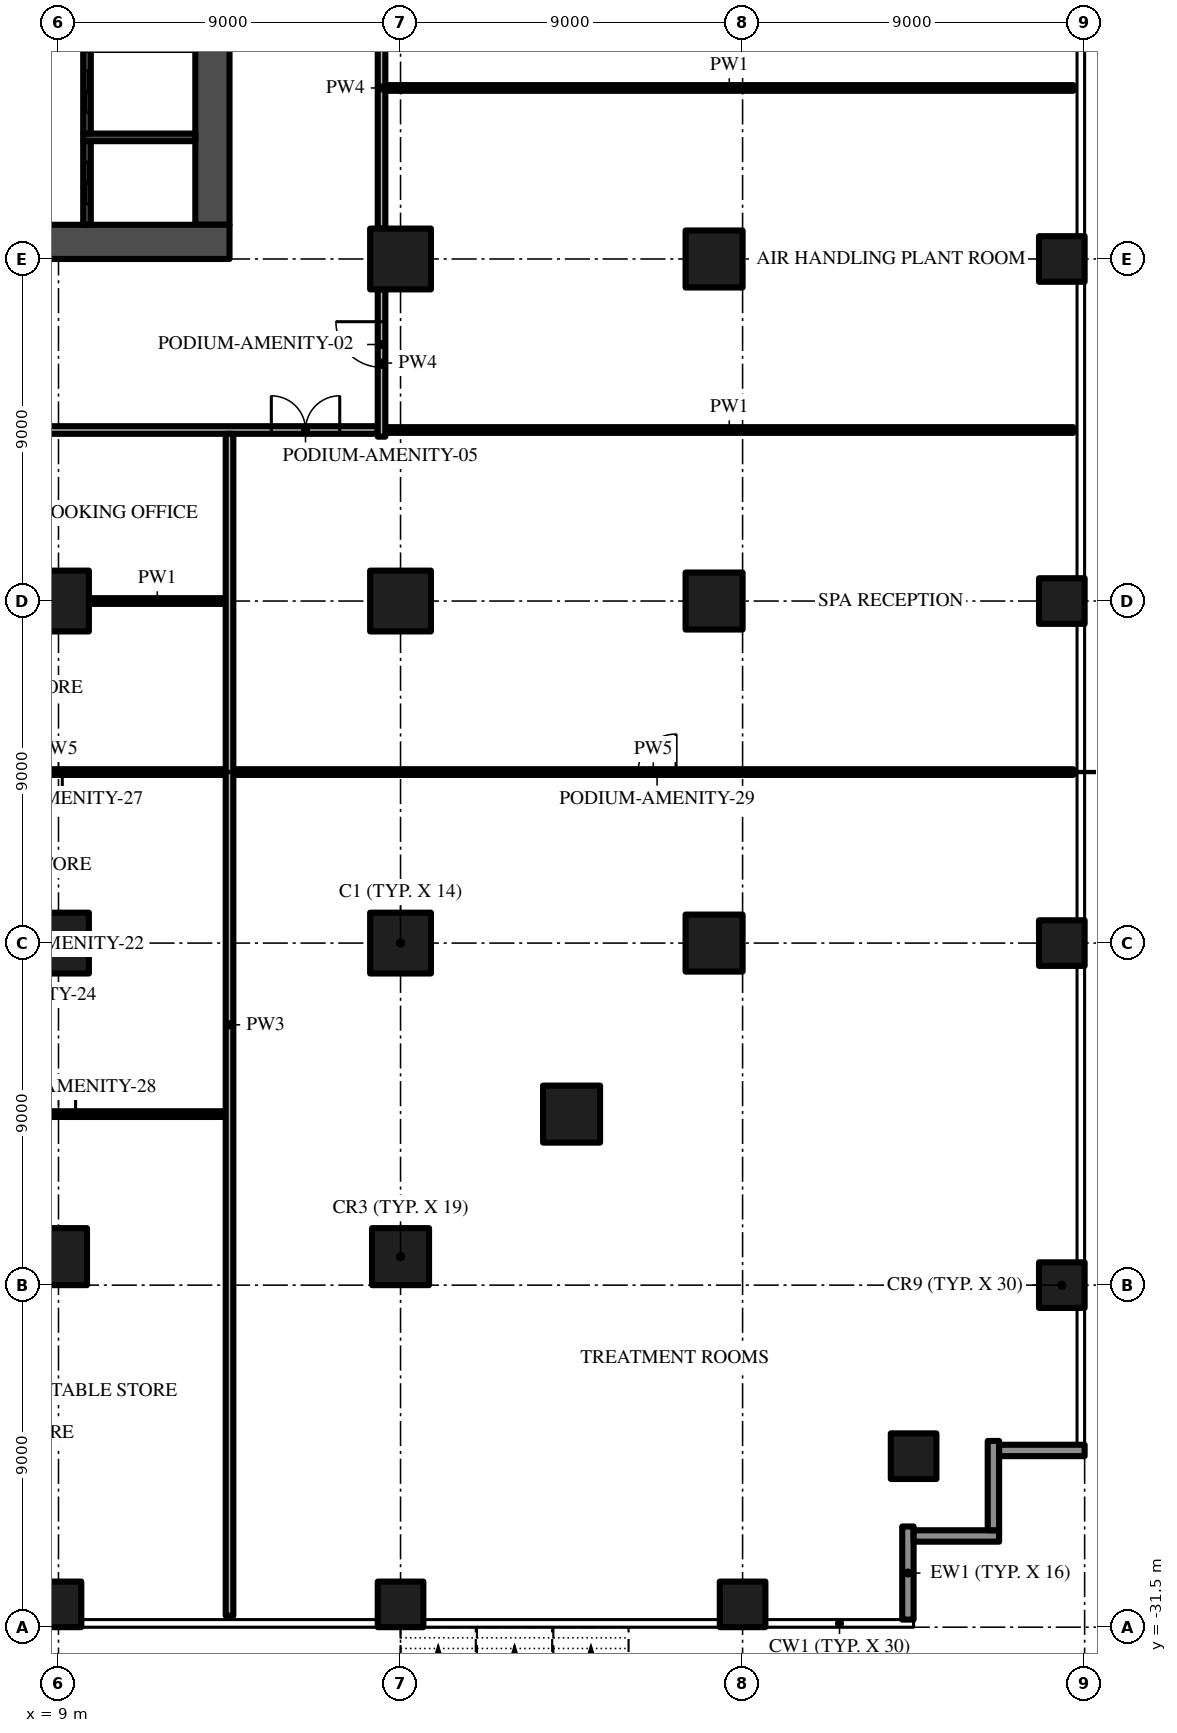
"""IFC4 building model, lengths in metres.
Left out: names, types, materials, properties, quantities, classifications, styles, units other than length and angle.
Written with IfcOpenShell. Run it as: python <this file> out.ifc"""

import sys

from ifc_helpers import new_model, si_unit, direction, frame, frame_2d, origin, origin_2d, place, context, subcontext, project, spatial, rectangle, extrude, element, fill, save


model = new_model("IFC4")
c1 = context("Model", 3, precision=1e-05, world=origin(), true_north=direction((0.0, 1.0)))
c2 = subcontext(c1, "Body", "Model", "MODEL_VIEW")
j1 = project(units=[si_unit("LENGTHUNIT", "METRE"), si_unit("PLANEANGLEUNIT", "RADIAN")], contexts=[c1])
p1 = place(None, origin())
s1 = spatial("IfcSite", under=j1, at=p1, CompositionType="ELEMENT")
p2 = place(p1, origin())
s2 = spatial("IfcBuilding", under=s1, at=p2, CompositionType="ELEMENT")
p3 = place(p2, frame((0.0, 0.0, 6.0)))
s3 = spatial("IfcBuildingStorey", under=s2, at=p3, CompositionType="ELEMENT", Elevation=6.0)
p4 = place(p3, frame((-13.5, 4.95, -0.4), z_axis=(0.0, 0.0, 1.0), x_axis=(1.0, 0.0, 0.0)))
e1 = element("IfcWall", 1, at=p4, inside=s3, PredefinedType="SHEAR", context=c2, shape_type="SweptSolid", body=[
    extrude(rectangle(XDim=27.0, YDim=0.9, at=frame_2d((13.5, 0.0))), origin(), (0.0, 0.0, 1.0), 4.55),
])
p5 = place(p4, frame((12.0, 0.0, 0.4)))
e2 = element("IfcOpeningElement", 2, at=p5, cuts=e1, PredefinedType="OPENING", context=c2, shape_type="SweptSolid", body=[
    extrude(rectangle(XDim=3.0, YDim=2.4, at=frame_2d((1.5, 1.2))), frame((0.0, 0.46, 0.0), z_axis=(0.0, -1.0, 0.0), x_axis=(1.0, 0.0, 0.0)), (0.0, 0.0, 1.0), 0.92),
])
p6 = place(p4, frame((4.9, 0.0, 0.4)))
e3 = element("IfcOpeningElement", 3, at=p6, cuts=e1, PredefinedType="OPENING", context=c2, shape_type="SweptSolid", body=[
    extrude(rectangle(XDim=1.2, YDim=2.2, at=frame_2d((0.6, 1.1))), frame((0.0, 0.46, 0.0), z_axis=(0.0, -1.0, 0.0), x_axis=(1.0, 0.0, 0.0)), (0.0, 0.0, 1.0), 0.92),
])
p7 = place(p4, frame((20.75, 0.0, 0.4)))
e4 = element("IfcOpeningElement", 4, at=p7, cuts=e1, PredefinedType="OPENING", context=c2, shape_type="SweptSolid", body=[
    extrude(rectangle(XDim=1.5, YDim=2.2, at=frame_2d((0.75, 1.1))), frame((0.0, 0.46, 0.0), z_axis=(0.0, -1.0, 0.0), x_axis=(1.0, 0.0, 0.0)), (0.0, 0.0, 1.0), 0.92),
])
p8 = place(p4, frame((17.4, 0.0, 0.4)))
e5 = element("IfcOpeningElement", 5, at=p8, cuts=e1, PredefinedType="OPENING", context=c2, shape_type="SweptSolid", body=[
    extrude(rectangle(XDim=1.2, YDim=2.2, at=frame_2d((0.6, 1.1))), frame((0.0, 0.46, 0.0), z_axis=(0.0, -1.0, 0.0), x_axis=(1.0, 0.0, 0.0)), (0.0, 0.0, 1.0), 0.92),
])
p9 = place(p3, frame((13.05, 5.4, -0.4), z_axis=(0.0, 0.0, 1.0), x_axis=(0.0, 1.0, 0.0)))
e6 = element("IfcWall", 6, at=p9, inside=s3, PredefinedType="SHEAR", context=c2, shape_type="SweptSolid", body=[
    extrude(rectangle(XDim=16.2, YDim=0.9, at=frame_2d((8.1, 0.0))), origin(), (0.0, 0.0, 1.0), 4.55),
])
p10 = place(p9, frame((6.0, 0.0, 0.4)))
e7 = element("IfcOpeningElement", 7, at=p10, cuts=e6, PredefinedType="OPENING", context=c2, shape_type="SweptSolid", body=[
    extrude(rectangle(XDim=1.2, YDim=2.2, at=frame_2d((0.6, 1.1))), frame((0.0, 0.46, 0.0), z_axis=(0.0, -1.0, 0.0), x_axis=(1.0, 0.0, 0.0)), (0.0, 0.0, 1.0), 0.92),
])
for number, where, z_axis, x_axis in (
    (8, (18.0, -30.9, 0.0), (0.0, 0.0, 1.0), (1.0, 0.0, 0.0)),
    (9, (27.0, -30.9, 0.0), (0.0, 0.0, 1.0), (1.0, 0.0, 0.0)),
    (10, (35.4, -13.5, 0.0), (0.0, 0.0, 1.0), (1.0, 0.0, 0.0)),
    (11, (35.4, -22.5, 0.0), (0.0, 0.0, 1.0), (1.0, 0.0, 0.0)),
    (12, (31.5, -27.0, 0.0), (0.0, 0.0, 1.0), (1.0, 0.0, 0.0)),
    (13, (35.4, -4.5, 0.0), (0.0, 0.0, 1.0), (1.0, 0.0, 0.0)),
    (14, (35.4, 4.5, 0.0), (0.0, 0.0, 1.0), (1.0, 0.0, 0.0)),
    (15, (9.0, -30.9, 0.0), (0.0, 0.0, 1.0), (1.0, 0.0, 0.0)),
):
    element("IfcColumn", number, at=place(p3, frame(where, z_axis=z_axis, x_axis=x_axis)), inside=s3, PredefinedType="COLUMN", context=c2, shape_type="SweptSolid", body=[
        extrude(rectangle(XDim=1.2, YDim=1.2, at=origin_2d()), origin(), (0.0, 0.0, 1.0), 4.15),
    ])
p11 = place(p3, frame((18.0, -13.5, 0.0), z_axis=(0.0, 0.0, 1.0), x_axis=(1.0, 0.0, 0.0)))
e16 = element("IfcColumn", 16, at=p11, inside=s3, PredefinedType="COLUMN", context=c2, shape_type="SweptSolid", body=[
    extrude(rectangle(XDim=1.6, YDim=1.6, at=origin_2d()), origin(), (0.0, 0.0, 1.0), 4.15),
])
p12 = place(p3, frame((18.0, -21.75, 0.0), z_axis=(0.0, 0.0, 1.0), x_axis=(1.0, 0.0, 0.0)))
e17 = element("IfcColumn", 17, at=p12, inside=s3, PredefinedType="COLUMN", context=c2, shape_type="SweptSolid", body=[
    extrude(rectangle(XDim=1.5, YDim=1.5, at=origin_2d()), origin(), (0.0, 0.0, 1.0), 4.15),
])
for number, where, z_axis, x_axis in (
    (18, (18.0, -4.5, 0.0), (0.0, 0.0, 1.0), (1.0, 0.0, 0.0)),
    (19, (18.0, 4.5, 0.0), (0.0, 0.0, 1.0), (1.0, 0.0, 0.0)),
):
    element("IfcColumn", number, at=place(p3, frame(where, z_axis=z_axis, x_axis=x_axis)), inside=s3, PredefinedType="COLUMN", context=c2, shape_type="SweptSolid", body=[
        extrude(rectangle(XDim=1.6, YDim=1.6, at=origin_2d()), origin(), (0.0, 0.0, 1.0), 4.15),
    ])
for number, where, z_axis, x_axis in (
    (20, (26.25, -13.5, 0.0), (0.0, 0.0, 1.0), (1.0, 0.0, 0.0)),
    (21, (22.5, -18.0, 0.0), (0.0, 0.0, 1.0), (1.0, 0.0, 0.0)),
    (22, (26.25, -4.5, 0.0), (0.0, 0.0, 1.0), (1.0, 0.0, 0.0)),
    (23, (26.25, 4.5, 0.0), (0.0, 0.0, 1.0), (1.0, 0.0, 0.0)),
):
    element("IfcColumn", number, at=place(p3, frame(where, z_axis=z_axis, x_axis=x_axis)), inside=s3, PredefinedType="COLUMN", context=c2, shape_type="SweptSolid", body=[
        extrude(rectangle(XDim=1.5, YDim=1.5, at=origin_2d()), origin(), (0.0, 0.0, 1.0), 4.15),
    ])
p13 = place(p3, frame((9.0, -13.5, 0.0), z_axis=(0.0, 0.0, 1.0), x_axis=(1.0, 0.0, 0.0)))
e24 = element("IfcColumn", 24, at=p13, inside=s3, PredefinedType="COLUMN", context=c2, shape_type="SweptSolid", body=[
    extrude(rectangle(XDim=1.6, YDim=1.6, at=origin_2d()), origin(), (0.0, 0.0, 1.0), 4.15),
])
p14 = place(p3, frame((9.0, -21.75, 0.0), z_axis=(0.0, 0.0, 1.0), x_axis=(1.0, 0.0, 0.0)))
e25 = element("IfcColumn", 25, at=p14, inside=s3, PredefinedType="COLUMN", context=c2, shape_type="SweptSolid", body=[
    extrude(rectangle(XDim=1.5, YDim=1.5, at=origin_2d()), origin(), (0.0, 0.0, 1.0), 4.15),
])
p15 = place(p3, frame((9.0, -4.5, 0.0), z_axis=(0.0, 0.0, 1.0), x_axis=(1.0, 0.0, 0.0)))
e26 = element("IfcColumn", 26, at=p15, inside=s3, PredefinedType="COLUMN", context=c2, shape_type="SweptSolid", body=[
    extrude(rectangle(XDim=1.6, YDim=1.6, at=origin_2d()), origin(), (0.0, 0.0, 1.0), 4.15),
])
p16 = place(p3, frame((31.35, -28.85, 0.0), z_axis=(0.0, 0.0, 1.0), x_axis=(0.0, -1.0, 0.0)))
e27 = element("IfcWall", 27, at=p16, inside=s3, PredefinedType="SOLIDWALL", context=c2, shape_type="SweptSolid", body=[
    extrude(rectangle(XDim=2.45, YDim=0.3, at=frame_2d((1.225, 0.0))), origin(), (0.0, 0.0, 1.0), 4.15),
])
p17 = place(p3, frame((33.75, -29.1, 0.0), z_axis=(0.0, 0.0, 1.0), x_axis=(-1.0, 0.0, 0.0)))
e28 = element("IfcWall", 28, at=p17, inside=s3, PredefinedType="SOLIDWALL", context=c2, shape_type="SweptSolid", body=[
    extrude(rectangle(XDim=2.25, YDim=0.3, at=frame_2d((1.125, 0.0))), origin(), (0.0, 0.0, 1.0), 4.15),
])
p18 = place(p3, frame((33.6, -26.6, 0.0), z_axis=(0.0, 0.0, 1.0), x_axis=(0.0, -1.0, 0.0)))
e29 = element("IfcWall", 29, at=p18, inside=s3, PredefinedType="SOLIDWALL", context=c2, shape_type="SweptSolid", body=[
    extrude(rectangle(XDim=2.35, YDim=0.3, at=frame_2d((1.175, 0.0))), origin(), (0.0, 0.0, 1.0), 4.15),
])
p19 = place(p3, frame((36.0, -26.85, 0.0), z_axis=(0.0, 0.0, 1.0), x_axis=(-1.0, 0.0, 0.0)))
e30 = element("IfcWall", 30, at=p19, inside=s3, PredefinedType="SOLIDWALL", context=c2, shape_type="SweptSolid", body=[
    extrude(rectangle(XDim=2.25, YDim=0.3, at=frame_2d((1.125, 0.0))), origin(), (0.0, 0.0, 1.0), 4.15),
])
p20 = place(p3, frame((9.75, 5.4, 0.0), z_axis=(0.0, 0.0, 1.0), x_axis=(0.0, 1.0, 0.0)))
e31 = element("IfcWall", 31, at=p20, inside=s3, PredefinedType="SHEAR", context=c2, shape_type="SweptSolid", body=[
    extrude(rectangle(XDim=2.2, YDim=0.2, at=frame_2d((1.1, 0.0))), origin(), (0.0, 0.0, 1.0), 4.15),
])
p21 = place(p20, frame((0.55, 0.0, 0.0)))
e32 = element("IfcOpeningElement", 32, at=p21, cuts=e31, PredefinedType="OPENING", context=c2, shape_type="SweptSolid", body=[
    extrude(rectangle(XDim=1.1, YDim=2.1, at=frame_2d((0.55, 1.05))), frame((0.0, 0.11, 0.0), z_axis=(0.0, -1.0, 0.0), x_axis=(1.0, 0.0, 0.0)), (0.0, 0.0, 1.0), 0.22),
])
p22 = place(p3, frame((9.65, 7.7, 0.0), z_axis=(0.0, 0.0, 1.0), x_axis=(1.0, 0.0, 0.0)))
e33 = element("IfcWall", 33, at=p22, inside=s3, PredefinedType="SHEAR", context=c2, shape_type="SweptSolid", body=[
    extrude(rectangle(XDim=2.95, YDim=0.2, at=frame_2d((1.475, 0.0))), origin(), (0.0, 0.0, 1.0), 4.15),
])
p23 = place(p3, frame((9.75, 7.8, 0.0), z_axis=(0.0, 0.0, 1.0), x_axis=(0.0, 1.0, 0.0)))
e34 = element("IfcWall", 34, at=p23, inside=s3, PredefinedType="SHEAR", context=c2, shape_type="SweptSolid", body=[
    extrude(rectangle(XDim=2.2, YDim=0.2, at=frame_2d((1.1, 0.0))), origin(), (0.0, 0.0, 1.0), 4.15),
])
p24 = place(p23, frame((0.55, 0.0, 0.0)))
e35 = element("IfcOpeningElement", 35, at=p24, cuts=e34, PredefinedType="OPENING", context=c2, shape_type="SweptSolid", body=[
    extrude(rectangle(XDim=1.1, YDim=2.1, at=frame_2d((0.55, 1.05))), frame((0.0, 0.11, 0.0), z_axis=(0.0, -1.0, 0.0), x_axis=(1.0, 0.0, 0.0)), (0.0, 0.0, 1.0), 0.22),
])
p25 = place(p3, frame((-13.4, -18.0, 0.0), z_axis=(0.0, 0.0, 1.0), x_axis=(1.0, 0.0, 0.0)))
e36 = element("IfcWall", 36, at=p25, inside=s3, PredefinedType="PARTITIONING", context=c2, shape_type="SweptSolid", body=[
    extrude(rectangle(XDim=26.8, YDim=0.15, at=frame_2d((13.4, 0.0))), origin(), (0.0, 0.0, 1.0), 4.15),
])
p26 = place(p25, frame((9.95, 0.0, 0.0)))
e37 = element("IfcOpeningElement", 37, at=p26, cuts=e36, PredefinedType="OPENING", context=c2, shape_type="SweptSolid", body=[
    extrude(rectangle(XDim=0.9, YDim=2.1, at=frame_2d((0.45, 1.05))), frame((0.0, 0.085, 0.0), z_axis=(0.0, -1.0, 0.0), x_axis=(1.0, 0.0, 0.0)), (0.0, 0.0, 1.0), 0.17),
])
p27 = place(p25, frame((15.95, 0.0, 0.0)))
e38 = element("IfcOpeningElement", 38, at=p27, cuts=e36, PredefinedType="OPENING", context=c2, shape_type="SweptSolid", body=[
    extrude(rectangle(XDim=0.9, YDim=2.1, at=frame_2d((0.45, 1.05))), frame((0.0, 0.085, 0.0), z_axis=(0.0, -1.0, 0.0), x_axis=(1.0, 0.0, 0.0)), (0.0, 0.0, 1.0), 0.17),
])
p28 = place(p25, frame((3.95, 0.0, 0.0)))
e39 = element("IfcOpeningElement", 39, at=p28, cuts=e36, PredefinedType="OPENING", context=c2, shape_type="SweptSolid", body=[
    extrude(rectangle(XDim=0.9, YDim=2.1, at=frame_2d((0.45, 1.05))), frame((0.0, 0.085, 0.0), z_axis=(0.0, -1.0, 0.0), x_axis=(1.0, 0.0, 0.0)), (0.0, 0.0, 1.0), 0.17),
])
p29 = place(p25, frame((21.95, 0.0, 0.0)))
e40 = element("IfcOpeningElement", 40, at=p29, cuts=e36, PredefinedType="OPENING", context=c2, shape_type="SweptSolid", body=[
    extrude(rectangle(XDim=0.9, YDim=2.1, at=frame_2d((0.45, 1.05))), frame((0.0, 0.085, 0.0), z_axis=(0.0, -1.0, 0.0), x_axis=(1.0, 0.0, 0.0)), (0.0, 0.0, 1.0), 0.17),
])
p30 = place(p3, frame((13.4, -9.0, 0.0), z_axis=(0.0, 0.0, 1.0), x_axis=(-1.0, 0.0, 0.0)))
e41 = element("IfcWall", 41, at=p30, inside=s3, PredefinedType="PARTITIONING", context=c2, shape_type="SweptSolid", body=[
    extrude(rectangle(XDim=8.8, YDim=0.15, at=frame_2d((4.4, 0.0))), origin(), (0.0, 0.0, 1.0), 4.15),
])
p31 = place(p30, frame((4.3, 0.0, 0.0)))
e42 = element("IfcOpeningElement", 42, at=p31, cuts=e41, PredefinedType="OPENING", context=c2, shape_type="SweptSolid", body=[
    extrude(rectangle(XDim=0.9, YDim=2.1, at=frame_2d((0.45, 1.05))), frame((0.0, 0.085, 0.0), z_axis=(0.0, -1.0, 0.0), x_axis=(1.0, 0.0, 0.0)), (0.0, 0.0, 1.0), 0.17),
])
p32 = place(p3, frame((13.6, -9.0, 0.0), z_axis=(0.0, 0.0, 1.0), x_axis=(1.0, 0.0, 0.0)))
e43 = element("IfcWall", 43, at=p32, inside=s3, PredefinedType="PARTITIONING", context=c2, shape_type="SweptSolid", body=[
    extrude(rectangle(XDim=22.1, YDim=0.15, at=frame_2d((11.05, 0.0))), origin(), (0.0, 0.0, 1.0), 4.15),
])
p33 = place(p32, frame((10.65, 0.0, 0.0)))
e44 = element("IfcOpeningElement", 44, at=p33, cuts=e43, PredefinedType="OPENING", context=c2, shape_type="SweptSolid", body=[
    extrude(rectangle(XDim=1.0, YDim=2.4, at=frame_2d((0.5, 1.2))), frame((0.0, 0.085, 0.0), z_axis=(0.0, -1.0, 0.0), x_axis=(1.0, 0.0, 0.0)), (0.0, 0.0, 1.0), 0.17),
])
p34 = place(p3, frame((9.8, -4.5, 0.0), z_axis=(0.0, 0.0, 1.0), x_axis=(1.0, 0.0, 0.0)))
e45 = element("IfcWall", 45, at=p34, inside=s3, PredefinedType="PARTITIONING", context=c2, shape_type="SweptSolid", body=[
    extrude(rectangle(XDim=3.6, YDim=0.15, at=frame_2d((1.8, 0.0))), origin(), (0.0, 0.0, 1.0), 4.15),
])
p35 = place(p3, frame((-17.4, 0.0, 0.0), z_axis=(0.0, 0.0, 1.0), x_axis=(1.0, 0.0, 0.0)))
e46 = element("IfcWall", 46, at=p35, inside=s3, PredefinedType="PARTITIONING", context=c2, shape_type="SweptSolid", body=[
    extrude(rectangle(XDim=34.8, YDim=0.2, at=frame_2d((17.4, 0.0))), origin(), (0.0, 0.0, 1.0), 4.15),
])
p36 = place(p35, frame((0.9, 0.0, 0.0)))
e47 = element("IfcOpeningElement", 47, at=p36, cuts=e46, PredefinedType="OPENING", context=c2, shape_type="SweptSolid", body=[
    extrude(rectangle(XDim=2.0, YDim=2.4, at=frame_2d((1.0, 1.2))), frame((0.0, 0.11, 0.0), z_axis=(0.0, -1.0, 0.0), x_axis=(1.0, 0.0, 0.0)), (0.0, 0.0, 1.0), 0.22),
])
p37 = place(p35, frame((16.4, 0.0, 0.0)))
e48 = element("IfcOpeningElement", 48, at=p37, cuts=e46, PredefinedType="OPENING", context=c2, shape_type="SweptSolid", body=[
    extrude(rectangle(XDim=2.0, YDim=2.4, at=frame_2d((1.0, 1.2))), frame((0.0, 0.11, 0.0), z_axis=(0.0, -1.0, 0.0), x_axis=(1.0, 0.0, 0.0)), (0.0, 0.0, 1.0), 0.22),
])
p38 = place(p35, frame((32.0, 0.0, 0.0)))
e49 = element("IfcOpeningElement", 49, at=p38, cuts=e46, PredefinedType="OPENING", context=c2, shape_type="SweptSolid", body=[
    extrude(rectangle(XDim=1.8, YDim=2.4, at=frame_2d((0.9, 1.2))), frame((0.0, 0.11, 0.0), z_axis=(0.0, -1.0, 0.0), x_axis=(1.0, 0.0, 0.0)), (0.0, 0.0, 1.0), 0.22),
])
for number, where, z_axis, x_axis in (
    (50, (17.6, 0.0, 0.0), (0.0, 0.0, 1.0), (1.0, 0.0, 0.0)),
    (51, (17.6, 9.0, 0.0), (0.0, 0.0, 1.0), (1.0, 0.0, 0.0)),
):
    element("IfcWall", number, at=place(p3, frame(where, z_axis=z_axis, x_axis=x_axis)), inside=s3, PredefinedType="PARTITIONING", context=c2, shape_type="SweptSolid", body=[
        extrude(rectangle(XDim=18.1, YDim=0.15, at=frame_2d((9.05, 0.0))), origin(), (0.0, 0.0, 1.0), 4.15),
    ])
p39 = place(p3, frame((13.5, -31.2, 0.0), z_axis=(0.0, 0.0, 1.0), x_axis=(0.0, 1.0, 0.0)))
e52 = element("IfcWall", 52, at=p39, inside=s3, PredefinedType="PARTITIONING", context=c2, shape_type="SweptSolid", body=[
    extrude(rectangle(XDim=31.1, YDim=0.2, at=frame_2d((15.55, 0.0))), origin(), (0.0, 0.0, 1.0), 4.15),
])
p40 = place(p3, frame((17.5, -0.175, 0.0), z_axis=(0.0, 0.0, 1.0), x_axis=(0.0, 1.0, 0.0)))
e53 = element("IfcWall", 53, at=p40, inside=s3, PredefinedType="PARTITIONING", context=c2, shape_type="SweptSolid", body=[
    extrude(rectangle(XDim=3.875, YDim=0.2, at=frame_2d((1.938, 0.0))), origin(), (0.0, 0.0, 1.0), 4.15),
])
p41 = place(p40, frame((1.825, 0.0, 0.0)))
e54 = element("IfcOpeningElement", 54, at=p41, cuts=e53, PredefinedType="OPENING", context=c2, shape_type="SweptSolid", body=[
    extrude(rectangle(XDim=1.2, YDim=2.4, at=frame_2d((0.6, 1.2))), frame((0.0, 0.11, 0.0), z_axis=(0.0, -1.0, 0.0), x_axis=(1.0, 0.0, 0.0)), (0.0, 0.0, 1.0), 0.22),
])
p42 = place(p3, frame((17.5, 5.3, 0.0), z_axis=(0.0, 0.0, 1.0), x_axis=(0.0, 1.0, 0.0)))
e55 = element("IfcWall", 55, at=p42, inside=s3, PredefinedType="PARTITIONING", context=c2, shape_type="SweptSolid", body=[
    extrude(rectangle(XDim=7.4, YDim=0.2, at=frame_2d((3.7, 0.0))), origin(), (0.0, 0.0, 1.0), 4.15),
])
p43 = place(p42, frame((6.05, 0.0, 0.0)))
e56 = element("IfcOpeningElement", 56, at=p43, cuts=e55, PredefinedType="OPENING", context=c2, shape_type="SweptSolid", body=[
    extrude(rectangle(XDim=1.2, YDim=2.4, at=frame_2d((0.6, 1.2))), frame((0.0, 0.11, 0.0), z_axis=(0.0, -1.0, 0.0), x_axis=(1.0, 0.0, 0.0)), (0.0, 0.0, 1.0), 0.22),
])
p44 = place(p21, origin())
e57 = element("IfcDoor", 57, at=p44, inside=s3, OperationType="SLIDING_TO_RIGHT", PredefinedType="DOOR", context=c2, shape_type="SweptSolid", body=[
    extrude(rectangle(XDim=1.1, YDim=2.1, at=frame_2d((0.55, 1.05))), frame((0.0, 0.025, 0.0), z_axis=(0.0, -1.0, 0.0), x_axis=(1.0, 0.0, 0.0)), (0.0, 0.0, 1.0), 0.05),
])
fill(e32, e57)
p45 = place(p24, origin())
e58 = element("IfcDoor", 58, at=p45, inside=s3, OperationType="SLIDING_TO_RIGHT", PredefinedType="DOOR", context=c2, shape_type="SweptSolid", body=[
    extrude(rectangle(XDim=1.1, YDim=2.1, at=frame_2d((0.55, 1.05))), frame((0.0, 0.025, 0.0), z_axis=(0.0, -1.0, 0.0), x_axis=(1.0, 0.0, 0.0)), (0.0, 0.0, 1.0), 0.05),
])
fill(e35, e58)
p46 = place(p41, origin())
e59 = element("IfcDoor", 59, at=p46, inside=s3, OperationType="SINGLE_SWING_RIGHT", PredefinedType="DOOR", context=c2, shape_type="SweptSolid", body=[
    extrude(rectangle(XDim=1.2, YDim=2.4, at=frame_2d((0.6, 1.2))), frame((0.0, 0.025, 0.0), z_axis=(0.0, -1.0, 0.0), x_axis=(1.0, 0.0, 0.0)), (0.0, 0.0, 1.0), 0.05),
])
fill(e54, e59)
p47 = place(p38, origin())
e60 = element("IfcDoor", 60, at=p47, inside=s3, OperationType="DOUBLE_DOOR_SINGLE_SWING", PredefinedType="DOOR", context=c2, shape_type="SweptSolid", body=[
    extrude(rectangle(XDim=1.8, YDim=2.4, at=frame_2d((0.9, 1.2))), frame((0.0, 0.025, 0.0), z_axis=(0.0, -1.0, 0.0), x_axis=(1.0, 0.0, 0.0)), (0.0, 0.0, 1.0), 0.05),
])
fill(e49, e60)
p48 = place(p31, origin())
e61 = element("IfcDoor", 61, at=p48, inside=s3, OperationType="SINGLE_SWING_LEFT", PredefinedType="DOOR", context=c2, shape_type="SweptSolid", body=[
    extrude(rectangle(XDim=0.9, YDim=2.1, at=frame_2d((0.45, 1.05))), frame((0.0, 0.025, 0.0), z_axis=(0.0, -1.0, 0.0), x_axis=(1.0, 0.0, 0.0)), (0.0, 0.0, 1.0), 0.05),
])
fill(e42, e61)
p49 = place(p29, origin())
e62 = element("IfcDoor", 62, at=p49, inside=s3, OperationType="SINGLE_SWING_RIGHT", PredefinedType="DOOR", context=c2, shape_type="SweptSolid", body=[
    extrude(rectangle(XDim=0.9, YDim=2.1, at=frame_2d((0.45, 1.05))), frame((0.0, 0.025, 0.0), z_axis=(0.0, -1.0, 0.0), x_axis=(1.0, 0.0, 0.0)), (0.0, 0.0, 1.0), 0.05),
])
fill(e40, e62)
p50 = place(p33, origin())
e63 = element("IfcDoor", 63, at=p50, inside=s3, OperationType="SINGLE_SWING_RIGHT", PredefinedType="DOOR", context=c2, shape_type="SweptSolid", body=[
    extrude(rectangle(XDim=1.0, YDim=2.4, at=frame_2d((0.5, 1.2))), frame((0.0, 0.025, 0.0), z_axis=(0.0, -1.0, 0.0), x_axis=(1.0, 0.0, 0.0)), (0.0, 0.0, 1.0), 0.05),
])
fill(e44, e63)
save(model, sys.argv[1])
